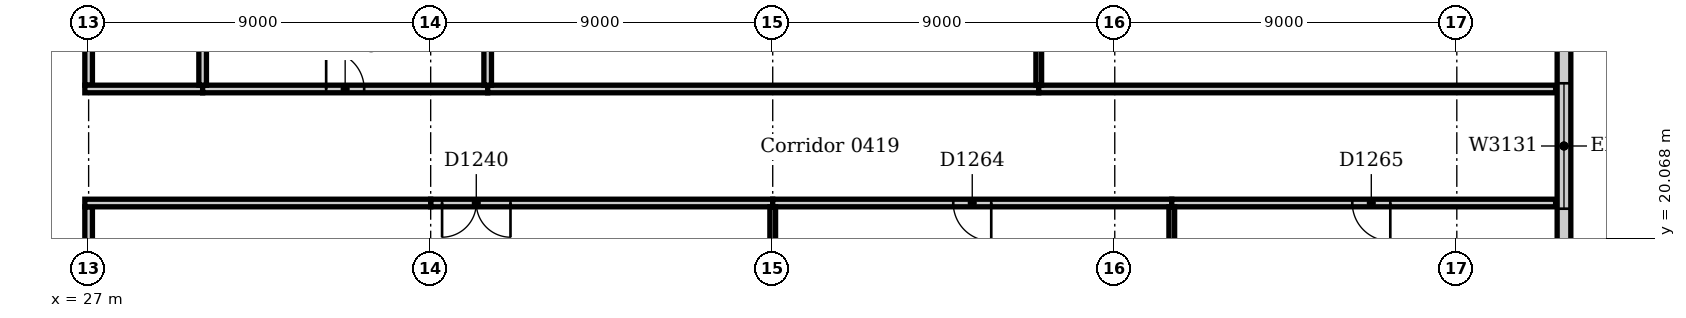
"""IFC4 building model, lengths in metres.
Left out: names, types, materials, properties, quantities, classifications, styles, units other than length and angle.
Written with IfcOpenShell. Run it as: python <this file> out.ifc"""

import sys

from ifc_helpers import new_model, si_unit, direction, frame, frame_2d, origin, place, context, subcontext, project, spatial, rectangle, extrude, element, fill, save


model = new_model("IFC4")
c1 = context("Model", 3, precision=1e-05, world=origin(), true_north=direction((0.0, 1.0)))
c2 = subcontext(c1, "Body", "Model", "MODEL_VIEW")
j1 = project(units=[si_unit("LENGTHUNIT", "METRE"), si_unit("PLANEANGLEUNIT", "RADIAN")], contexts=[c1])
p1 = place(None, origin())
s1 = spatial("IfcSite", under=j1, at=p1, CompositionType="ELEMENT")
p2 = place(p1, origin())
s2 = spatial("IfcBuilding", under=s1, at=p2, CompositionType="ELEMENT")
p3 = place(p2, frame((0.0, 0.0, 21.0)))
s3 = spatial("IfcBuildingStorey", under=s2, at=p3, CompositionType="ELEMENT", Elevation=21.0)
p4 = place(p3, frame((65.82, -9.0, 0.0), z_axis=(0.0, 0.0, 1.0), x_axis=(0.0, 1.0, 0.0)))
e1 = element("IfcWall", 1, at=p4, inside=s3, PredefinedType="STANDARD", context=c2, shape_type="SweptSolid", body=[
    extrude(rectangle(XDim=63.0, YDim=0.36, at=frame_2d((31.5, 0.0))), origin(), (0.0, 0.0, 1.0), 4.85),
])
p5 = place(p4, frame((2.85, 0.0, 0.9)))
e2 = element("IfcOpeningElement", 2, at=p5, cuts=e1, PredefinedType="OPENING", context=c2, shape_type="SweptSolid", body=[
    extrude(rectangle(XDim=3.3, YDim=2.4, at=frame_2d((1.65, 1.2))), frame((0.0, 0.19, 0.0), z_axis=(0.0, -1.0, 0.0), x_axis=(1.0, 0.0, 0.0)), (0.0, 0.0, 1.0), 0.38),
])
p6 = place(p4, frame((7.35, 0.0, 0.9)))
e3 = element("IfcOpeningElement", 3, at=p6, cuts=e1, PredefinedType="OPENING", context=c2, shape_type="SweptSolid", body=[
    extrude(rectangle(XDim=3.3, YDim=2.4, at=frame_2d((1.65, 1.2))), frame((0.0, 0.19, 0.0), z_axis=(0.0, -1.0, 0.0), x_axis=(1.0, 0.0, 0.0)), (0.0, 0.0, 1.0), 0.38),
])
p7 = place(p4, frame((11.85, 0.0, 0.9)))
e4 = element("IfcOpeningElement", 4, at=p7, cuts=e1, PredefinedType="OPENING", context=c2, shape_type="SweptSolid", body=[
    extrude(rectangle(XDim=3.3, YDim=2.4, at=frame_2d((1.65, 1.2))), frame((0.0, 0.19, 0.0), z_axis=(0.0, -1.0, 0.0), x_axis=(1.0, 0.0, 0.0)), (0.0, 0.0, 1.0), 0.38),
])
p8 = place(p4, frame((16.35, 0.0, 0.9)))
e5 = element("IfcOpeningElement", 5, at=p8, cuts=e1, PredefinedType="OPENING", context=c2, shape_type="SweptSolid", body=[
    extrude(rectangle(XDim=3.3, YDim=2.4, at=frame_2d((1.65, 1.2))), frame((0.0, 0.19, 0.0), z_axis=(0.0, -1.0, 0.0), x_axis=(1.0, 0.0, 0.0)), (0.0, 0.0, 1.0), 0.38),
])
p9 = place(p4, frame((20.85, 0.0, 0.9)))
e6 = element("IfcOpeningElement", 6, at=p9, cuts=e1, PredefinedType="OPENING", context=c2, shape_type="SweptSolid", body=[
    extrude(rectangle(XDim=3.3, YDim=2.4, at=frame_2d((1.65, 1.2))), frame((0.0, 0.19, 0.0), z_axis=(0.0, -1.0, 0.0), x_axis=(1.0, 0.0, 0.0)), (0.0, 0.0, 1.0), 0.38),
])
p10 = place(p4, frame((25.35, 0.0, 0.9)))
e7 = element("IfcOpeningElement", 7, at=p10, cuts=e1, PredefinedType="OPENING", context=c2, shape_type="SweptSolid", body=[
    extrude(rectangle(XDim=3.3, YDim=2.4, at=frame_2d((1.65, 1.2))), frame((0.0, 0.19, 0.0), z_axis=(0.0, -1.0, 0.0), x_axis=(1.0, 0.0, 0.0)), (0.0, 0.0, 1.0), 0.38),
])
p11 = place(p4, frame((29.85, 0.0, 0.9)))
e8 = element("IfcOpeningElement", 8, at=p11, cuts=e1, PredefinedType="OPENING", context=c2, shape_type="SweptSolid", body=[
    extrude(rectangle(XDim=3.3, YDim=2.4, at=frame_2d((1.65, 1.2))), frame((0.0, 0.19, 0.0), z_axis=(0.0, -1.0, 0.0), x_axis=(1.0, 0.0, 0.0)), (0.0, 0.0, 1.0), 0.38),
])
p12 = place(p4, frame((34.35, 0.0, 0.9)))
e9 = element("IfcOpeningElement", 9, at=p12, cuts=e1, PredefinedType="OPENING", context=c2, shape_type="SweptSolid", body=[
    extrude(rectangle(XDim=3.3, YDim=2.4, at=frame_2d((1.65, 1.2))), frame((0.0, 0.19, 0.0), z_axis=(0.0, -1.0, 0.0), x_axis=(1.0, 0.0, 0.0)), (0.0, 0.0, 1.0), 0.38),
])
p13 = place(p4, frame((38.85, 0.0, 0.9)))
e10 = element("IfcOpeningElement", 10, at=p13, cuts=e1, PredefinedType="OPENING", context=c2, shape_type="SweptSolid", body=[
    extrude(rectangle(XDim=3.3, YDim=2.4, at=frame_2d((1.65, 1.2))), frame((0.0, 0.19, 0.0), z_axis=(0.0, -1.0, 0.0), x_axis=(1.0, 0.0, 0.0)), (0.0, 0.0, 1.0), 0.38),
])
p14 = place(p4, frame((43.35, 0.0, 0.9)))
e11 = element("IfcOpeningElement", 11, at=p14, cuts=e1, PredefinedType="OPENING", context=c2, shape_type="SweptSolid", body=[
    extrude(rectangle(XDim=3.3, YDim=2.4, at=frame_2d((1.65, 1.2))), frame((0.0, 0.19, 0.0), z_axis=(0.0, -1.0, 0.0), x_axis=(1.0, 0.0, 0.0)), (0.0, 0.0, 1.0), 0.38),
])
p15 = place(p4, frame((47.85, 0.0, 0.9)))
e12 = element("IfcOpeningElement", 12, at=p15, cuts=e1, PredefinedType="OPENING", context=c2, shape_type="SweptSolid", body=[
    extrude(rectangle(XDim=3.3, YDim=2.4, at=frame_2d((1.65, 1.2))), frame((0.0, 0.19, 0.0), z_axis=(0.0, -1.0, 0.0), x_axis=(1.0, 0.0, 0.0)), (0.0, 0.0, 1.0), 0.38),
])
p16 = place(p4, frame((52.35, 0.0, 0.9)))
e13 = element("IfcOpeningElement", 13, at=p16, cuts=e1, PredefinedType="OPENING", context=c2, shape_type="SweptSolid", body=[
    extrude(rectangle(XDim=3.3, YDim=2.4, at=frame_2d((1.65, 1.2))), frame((0.0, 0.19, 0.0), z_axis=(0.0, -1.0, 0.0), x_axis=(1.0, 0.0, 0.0)), (0.0, 0.0, 1.0), 0.38),
])
p17 = place(p4, frame((56.85, 0.0, 0.9)))
e14 = element("IfcOpeningElement", 14, at=p17, cuts=e1, PredefinedType="OPENING", context=c2, shape_type="SweptSolid", body=[
    extrude(rectangle(XDim=3.3, YDim=2.4, at=frame_2d((1.65, 1.2))), frame((0.0, 0.19, 0.0), z_axis=(0.0, -1.0, 0.0), x_axis=(1.0, 0.0, 0.0)), (0.0, 0.0, 1.0), 0.38),
])
for number, where, z_axis, x_axis in (
    (15, (27.0, 18.52, 0.0), (0.0, 0.0, 1.0), (0.0, 1.0, 0.0)),
    (16, (27.0, 24.1, 0.0), (0.0, 0.0, 1.0), (0.0, 1.0, 0.0)),
):
    element("IfcWall", number, at=place(p3, frame(where, z_axis=z_axis, x_axis=x_axis)), inside=s3, PredefinedType="PARTITIONING", context=c2, shape_type="SweptSolid", body=[
        extrude(rectangle(XDim=2.38, YDim=0.2, at=frame_2d((1.19, 0.0))), origin(), (0.0, 0.0, 1.0), 4.158),
    ])
p18 = place(p3, frame((36.0, 21.0, 0.0), z_axis=(0.0, 0.0, 1.0), x_axis=(1.0, 0.0, 0.0)))
e17 = element("IfcWall", 17, at=p18, inside=s3, PredefinedType="PARTITIONING", context=c2, shape_type="SweptSolid", body=[
    extrude(rectangle(XDim=9.0, YDim=0.2, at=frame_2d((4.5, 0.0))), origin(), (0.0, 0.0, 1.0), 4.85),
])
p19 = place(p18, frame((0.3, 0.0, 0.0)))
e18 = element("IfcOpeningElement", 18, at=p19, cuts=e17, PredefinedType="OPENING", context=c2, shape_type="SweptSolid", body=[
    extrude(rectangle(XDim=1.8, YDim=2.1, at=frame_2d((0.9, 1.05))), frame((0.0, 0.11, 0.0), z_axis=(0.0, -1.0, 0.0), x_axis=(1.0, 0.0, 0.0)), (0.0, 0.0, 1.0), 0.22),
])
p20 = place(p3, frame((26.9, 21.0, 0.0), z_axis=(0.0, 0.0, 1.0), x_axis=(1.0, 0.0, 0.0)))
e19 = element("IfcWall", 19, at=p20, inside=s3, PredefinedType="PARTITIONING", context=c2, shape_type="SweptSolid", body=[
    extrude(rectangle(XDim=9.1, YDim=0.2, at=frame_2d((4.55, 0.0))), origin(), (0.0, 0.0, 1.0), 4.85),
])
p21 = place(p3, frame((26.9, 24.0, 0.0), z_axis=(0.0, 0.0, 1.0), x_axis=(1.0, 0.0, 0.0)))
e20 = element("IfcWall", 20, at=p21, inside=s3, PredefinedType="PARTITIONING", context=c2, shape_type="SweptSolid", body=[
    extrude(rectangle(XDim=3.1, YDim=0.2, at=frame_2d((1.55, 0.0))), origin(), (0.0, 0.0, 1.0), 4.85),
])
p22 = place(p3, frame((30.0, 24.0, 0.0), z_axis=(0.0, 0.0, 1.0), x_axis=(1.0, 0.0, 0.0)))
e21 = element("IfcWall", 21, at=p22, inside=s3, PredefinedType="PARTITIONING", context=c2, shape_type="SweptSolid", body=[
    extrude(rectangle(XDim=7.5, YDim=0.2, at=frame_2d((3.75, 0.0))), origin(), (0.0, 0.0, 1.0), 4.85),
])
p23 = place(p22, frame((3.25, 0.0, 0.0)))
e22 = element("IfcOpeningElement", 22, at=p23, cuts=e21, PredefinedType="OPENING", context=c2, shape_type="SweptSolid", body=[
    extrude(rectangle(XDim=1.0, YDim=2.1, at=frame_2d((0.5, 1.05))), frame((0.0, 0.11, 0.0), z_axis=(0.0, -1.0, 0.0), x_axis=(1.0, 0.0, 0.0)), (0.0, 0.0, 1.0), 0.22),
])
p24 = place(p3, frame((45.0, 21.0, 0.0), z_axis=(0.0, 0.0, 1.0), x_axis=(1.0, 0.0, 0.0)))
e23 = element("IfcWall", 23, at=p24, inside=s3, PredefinedType="PARTITIONING", context=c2, shape_type="SweptSolid", body=[
    extrude(rectangle(XDim=10.5, YDim=0.2, at=frame_2d((5.25, 0.0))), origin(), (0.0, 0.0, 1.0), 4.85),
])
p25 = place(p24, frame((4.75, 0.0, 0.0)))
e24 = element("IfcOpeningElement", 24, at=p25, cuts=e23, PredefinedType="OPENING", context=c2, shape_type="SweptSolid", body=[
    extrude(rectangle(XDim=1.0, YDim=2.1, at=frame_2d((0.5, 1.05))), frame((0.0, 0.11, 0.0), z_axis=(0.0, -1.0, 0.0), x_axis=(1.0, 0.0, 0.0)), (0.0, 0.0, 1.0), 0.22),
])
p26 = place(p3, frame((55.5, 21.0, 0.0), z_axis=(0.0, 0.0, 1.0), x_axis=(1.0, 0.0, 0.0)))
e25 = element("IfcWall", 25, at=p26, inside=s3, PredefinedType="PARTITIONING", context=c2, shape_type="SweptSolid", body=[
    extrude(rectangle(XDim=10.1, YDim=0.2, at=frame_2d((5.05, 0.0))), origin(), (0.0, 0.0, 1.0), 4.7),
])
p27 = place(p26, frame((4.75, 0.0, 0.0)))
e26 = element("IfcOpeningElement", 26, at=p27, cuts=e25, PredefinedType="OPENING", context=c2, shape_type="SweptSolid", body=[
    extrude(rectangle(XDim=1.0, YDim=2.1, at=frame_2d((0.5, 1.05))), frame((0.0, 0.11, 0.0), z_axis=(0.0, -1.0, 0.0), x_axis=(1.0, 0.0, 0.0)), (0.0, 0.0, 1.0), 0.22),
])
p28 = place(p3, frame((37.5, 24.0, 0.0), z_axis=(0.0, 0.0, 1.0), x_axis=(1.0, 0.0, 0.0)))
e27 = element("IfcWall", 27, at=p28, inside=s3, PredefinedType="PARTITIONING", context=c2, shape_type="SweptSolid", body=[
    extrude(rectangle(XDim=14.5, YDim=0.2, at=frame_2d((7.25, 0.0))), origin(), (0.0, 0.0, 1.0), 4.85),
])
p29 = place(p3, frame((52.0, 24.0, 0.0), z_axis=(0.0, 0.0, 1.0), x_axis=(1.0, 0.0, 0.0)))
e28 = element("IfcWall", 28, at=p29, inside=s3, PredefinedType="PARTITIONING", context=c2, shape_type="SweptSolid", body=[
    extrude(rectangle(XDim=13.6, YDim=0.2, at=frame_2d((6.8, 0.0))), origin(), (0.0, 0.0, 1.0), 4.7),
])
p30 = place(p3, frame((45.0, 18.52, 0.0), z_axis=(0.0, 0.0, 1.0), x_axis=(0.0, 1.0, 0.0)))
e29 = element("IfcWall", 29, at=p30, inside=s3, PredefinedType="PARTITIONING", context=c2, shape_type="SweptSolid", body=[
    extrude(rectangle(XDim=2.38, YDim=0.15, at=frame_2d((1.19, 0.0))), origin(), (0.0, 0.0, 1.0), 4.158),
])
for number, where, z_axis, x_axis in (
    (30, (30.0, 24.1, 0.0), (0.0, 0.0, 1.0), (0.0, 1.0, 0.0)),
    (31, (37.5, 24.1, 0.0), (0.0, 0.0, 1.0), (0.0, 1.0, 0.0)),
):
    element("IfcWall", number, at=place(p3, frame(where, z_axis=z_axis, x_axis=x_axis)), inside=s3, PredefinedType="PARTITIONING", context=c2, shape_type="SweptSolid", body=[
        extrude(rectangle(XDim=5.15, YDim=0.2, at=frame_2d((2.575, 0.0))), origin(), (0.0, 0.0, 1.0), 4.85),
    ])
p31 = place(p3, frame((55.5, 12.375, 0.0), z_axis=(0.0, 0.0, 1.0), x_axis=(0.0, 1.0, 0.0)))
e32 = element("IfcWall", 32, at=p31, inside=s3, PredefinedType="PARTITIONING", context=c2, shape_type="SweptSolid", body=[
    extrude(rectangle(XDim=8.525, YDim=0.15, at=frame_2d((4.263, 0.0))), origin(), (0.0, 0.0, 1.0), 4.85),
])
p32 = place(p3, frame((52.0, 24.1, 0.0), z_axis=(0.0, 0.0, 1.0), x_axis=(0.0, 1.0, 0.0)))
e33 = element("IfcWall", 33, at=p32, inside=s3, PredefinedType="PARTITIONING", context=c2, shape_type="SweptSolid", body=[
    extrude(rectangle(XDim=17.8, YDim=0.15, at=frame_2d((8.9, 0.0))), origin(), (0.0, 0.0, 1.0), 4.85),
])
p33 = place(p11, origin())
e34 = element("IfcWindow", 34, at=p33, inside=s3, PartitioningType="SINGLE_PANEL", PredefinedType="WINDOW", context=c2, shape_type="SweptSolid", body=[
    extrude(rectangle(XDim=3.3, YDim=2.4, at=frame_2d((1.65, 1.2))), frame((0.0, 0.13, 0.0), z_axis=(0.0, -1.0, 0.0), x_axis=(1.0, 0.0, 0.0)), (0.0, 0.0, 1.0), 0.06),
])
fill(e8, e34)
p34 = place(p19, frame((1.8, 0.0, 0.0), z_axis=(0.0, 0.0, 1.0), x_axis=(-1.0, 0.0, 0.0)))
e35 = element("IfcDoor", 35, at=p34, inside=s3, OperationType="DOUBLE_DOOR_SINGLE_SWING", PredefinedType="DOOR", context=c2, shape_type="SweptSolid", body=[
    extrude(rectangle(XDim=1.8, YDim=2.1, at=frame_2d((0.9, 1.05))), frame((0.0, 0.025, 0.0), z_axis=(0.0, -1.0, 0.0), x_axis=(1.0, 0.0, 0.0)), (0.0, 0.0, 1.0), 0.05),
])
fill(e18, e35)
p35 = place(p23, origin())
e36 = element("IfcDoor", 36, at=p35, inside=s3, OperationType="SINGLE_SWING_LEFT", PredefinedType="DOOR", context=c2, shape_type="SweptSolid", body=[
    extrude(rectangle(XDim=1.0, YDim=2.1, at=frame_2d((0.5, 1.05))), frame((0.0, 0.025, 0.0), z_axis=(0.0, -1.0, 0.0), x_axis=(1.0, 0.0, 0.0)), (0.0, 0.0, 1.0), 0.05),
])
fill(e22, e36)
p36 = place(p25, frame((1.0, 0.0, 0.0), z_axis=(0.0, 0.0, 1.0), x_axis=(-1.0, 0.0, 0.0)))
e37 = element("IfcDoor", 37, at=p36, inside=s3, OperationType="SINGLE_SWING_LEFT", PredefinedType="DOOR", context=c2, shape_type="SweptSolid", body=[
    extrude(rectangle(XDim=1.0, YDim=2.1, at=frame_2d((0.5, 1.05))), frame((0.0, 0.025, 0.0), z_axis=(0.0, -1.0, 0.0), x_axis=(1.0, 0.0, 0.0)), (0.0, 0.0, 1.0), 0.05),
])
fill(e24, e37)
p37 = place(p27, frame((1.0, 0.0, 0.0), z_axis=(0.0, 0.0, 1.0), x_axis=(-1.0, 0.0, 0.0)))
e38 = element("IfcDoor", 38, at=p37, inside=s3, OperationType="SINGLE_SWING_LEFT", PredefinedType="DOOR", context=c2, shape_type="SweptSolid", body=[
    extrude(rectangle(XDim=1.0, YDim=2.1, at=frame_2d((0.5, 1.05))), frame((0.0, 0.025, 0.0), z_axis=(0.0, -1.0, 0.0), x_axis=(1.0, 0.0, 0.0)), (0.0, 0.0, 1.0), 0.05),
])
fill(e26, e38)
save(model, sys.argv[1])
